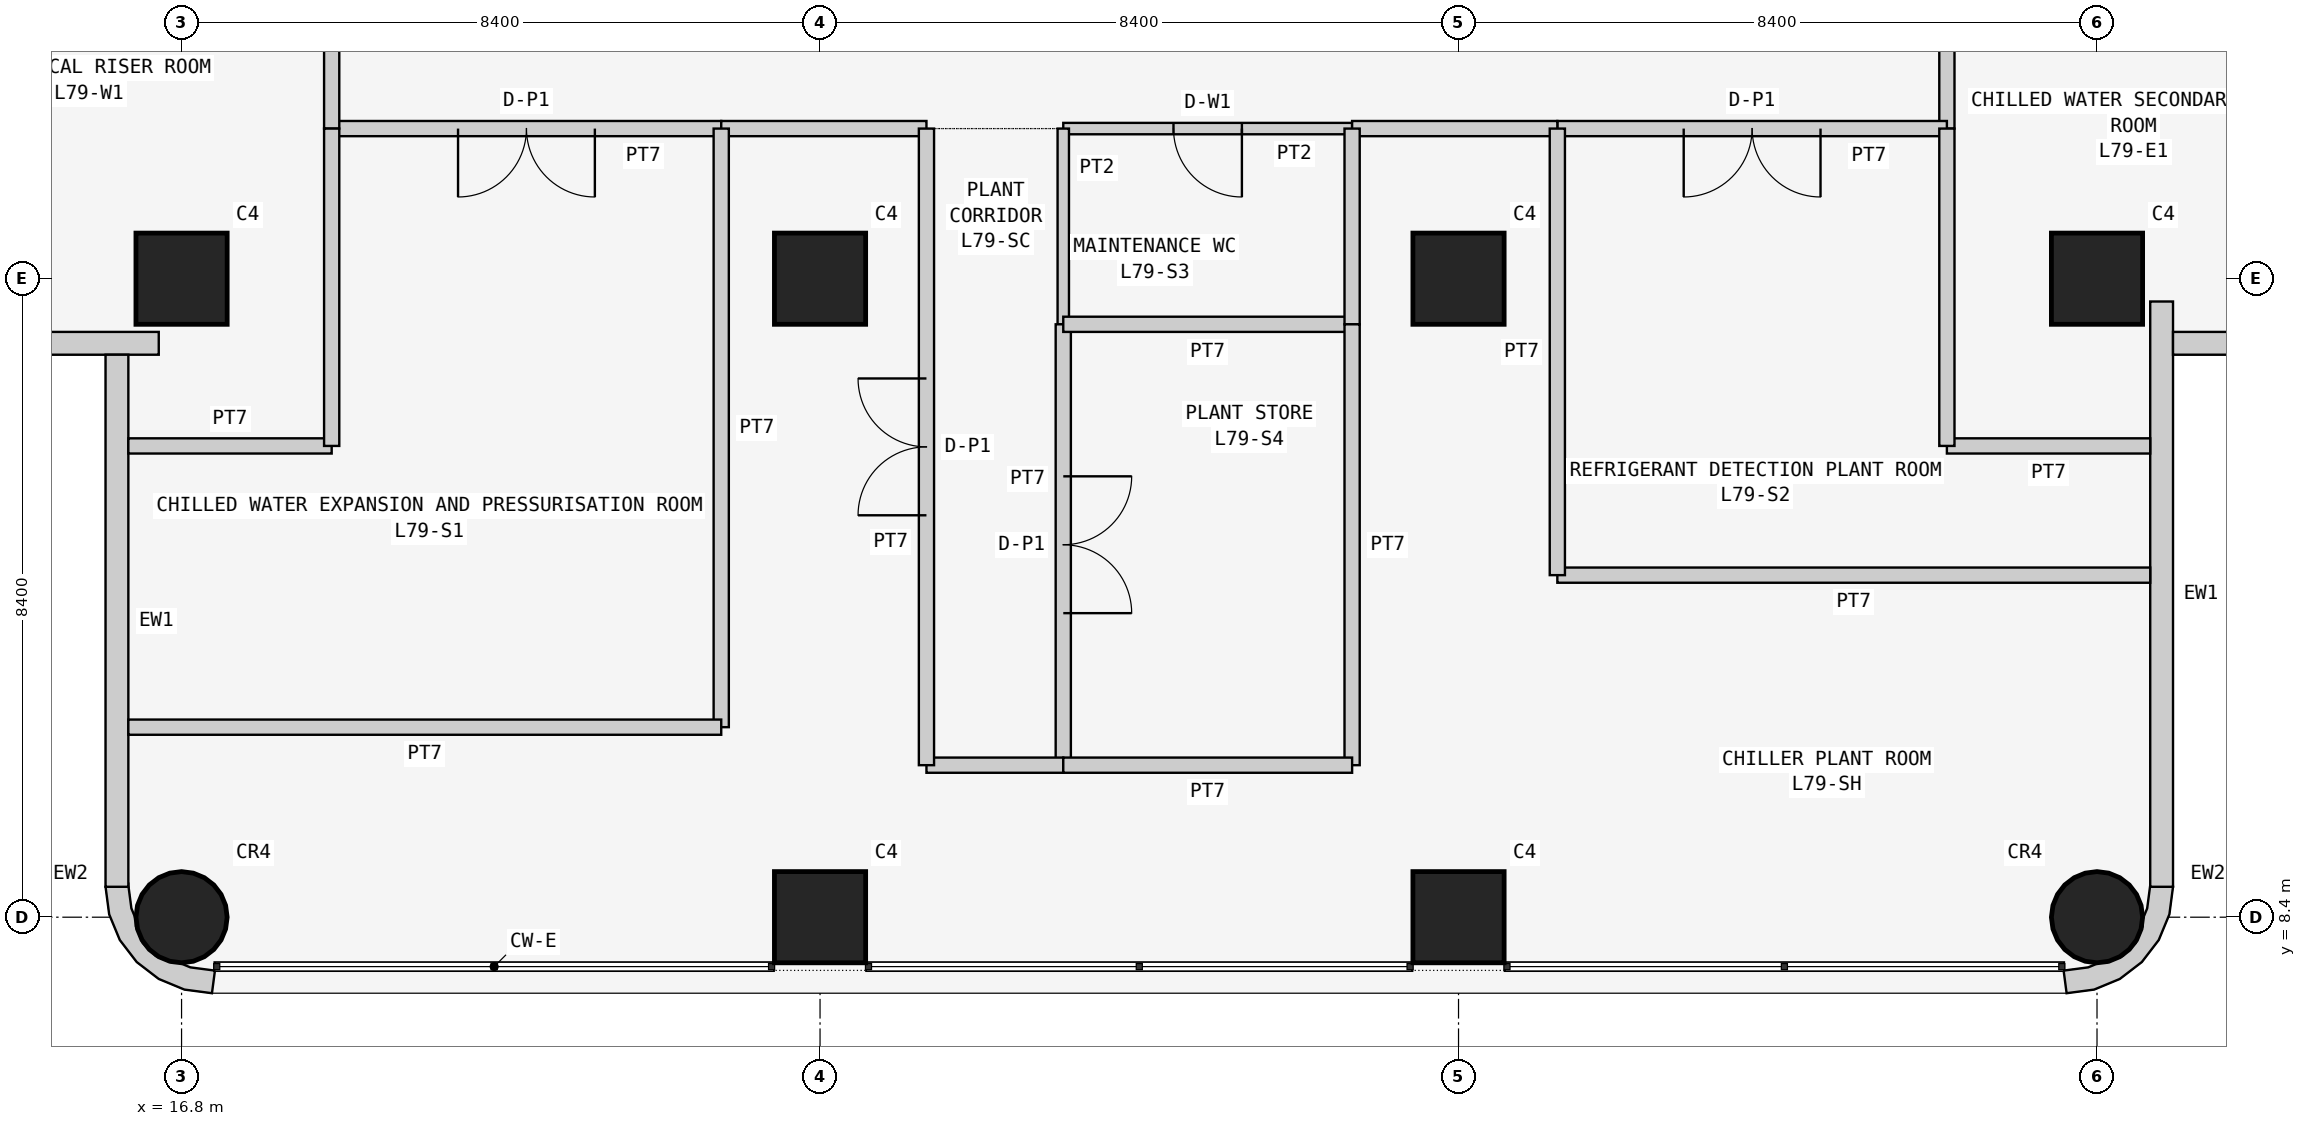
"""IFC4 building model, lengths in metres.
Left out: names, types, materials, properties, quantities, classifications, styles, units other than length and angle.
Written with IfcOpenShell. Run it as: python <this file> out.ifc"""

import sys

from ifc_helpers import new_model, si_unit, direction, frame, frame_2d, origin, origin_2d, place, context, subcontext, project, spatial, polyline, rectangle, circle, outline, extrude, element, fill, save


model = new_model("IFC4")
c1 = context("Model", 3, precision=1e-05, world=origin(), true_north=direction((0.0, 1.0)))
c2 = subcontext(c1, "Body", "Model", "MODEL_VIEW")
j1 = project(units=[si_unit("LENGTHUNIT", "METRE"), si_unit("PLANEANGLEUNIT", "RADIAN")], contexts=[c1])
p1 = place(None, origin())
s1 = spatial("IfcSite", under=j1, at=p1, CompositionType="ELEMENT")
p2 = place(p1, origin())
s2 = spatial("IfcBuilding", under=s1, at=p2, CompositionType="ELEMENT")
p3 = place(p2, frame((0.0, 0.0, 300.9)))
s3 = spatial("IfcBuildingStorey", under=s2, at=p3, CompositionType="ELEMENT", Elevation=300.9)
p4 = place(p3, frame((16.8, 8.4, 0.0), z_axis=(0.0, 0.0, 1.0), x_axis=(1.0, 0.0, 0.0)))
e1 = element("IfcColumn", 1, at=p4, inside=s3, PredefinedType="COLUMN", context=c2, shape_type="SweptSolid", body=[
    extrude(circle(Radius=0.6, at=origin_2d()), origin(), (0.0, 0.0, 1.0), 4.5),
])
for number, where, z_axis, x_axis in (
    (2, (16.8, 16.8, 0.0), (0.0, 0.0, 1.0), (1.0, 0.0, 0.0)),
    (3, (25.2, 8.4, 0.0), (0.0, 0.0, 1.0), (1.0, 0.0, 0.0)),
    (4, (25.2, 16.8, 0.0), (0.0, 0.0, 1.0), (1.0, 0.0, 0.0)),
    (5, (33.6, 8.4, 0.0), (0.0, 0.0, 1.0), (1.0, 0.0, 0.0)),
    (6, (33.6, 16.8, 0.0), (0.0, 0.0, 1.0), (1.0, 0.0, 0.0)),
):
    element("IfcColumn", number, at=place(p3, frame(where, z_axis=z_axis, x_axis=x_axis)), inside=s3, PredefinedType="COLUMN", context=c2, shape_type="SweptSolid", body=[
        extrude(rectangle(XDim=1.2, YDim=1.2, at=origin_2d()), origin(), (0.0, 0.0, 1.0), 4.5),
    ])
p5 = place(p3, frame((42.0, 8.4, 0.0), z_axis=(0.0, 0.0, 1.0), x_axis=(1.0, 0.0, 0.0)))
e7 = element("IfcColumn", 7, at=p5, inside=s3, PredefinedType="COLUMN", context=c2, shape_type="SweptSolid", body=[
    extrude(circle(Radius=0.6, at=origin_2d()), origin(), (0.0, 0.0, 1.0), 4.5),
])
p6 = place(p3, frame((42.0, 16.8, 0.0), z_axis=(0.0, 0.0, 1.0), x_axis=(1.0, 0.0, 0.0)))
e8 = element("IfcColumn", 8, at=p6, inside=s3, PredefinedType="COLUMN", context=c2, shape_type="SweptSolid", body=[
    extrude(rectangle(XDim=1.2, YDim=1.2, at=origin_2d()), origin(), (0.0, 0.0, 1.0), 4.5),
])
p7 = place(p3, frame((8.8, 15.95, 0.0), z_axis=(0.0, 0.0, 1.0), x_axis=(1.0, 0.0, 0.0)))
e9 = element("IfcWall", 9, at=p7, inside=s3, PredefinedType="SOLIDWALL", context=c2, shape_type="SweptSolid", body=[
    extrude(rectangle(XDim=7.7, YDim=0.3, at=frame_2d((3.85, 0.0))), origin(), (0.0, 0.0, 1.0), 4.25),
])
p8 = place(p3, frame((15.95, 15.8, 0.0), z_axis=(0.0, 0.0, 1.0), x_axis=(0.0, -1.0, 0.0)))
e10 = element("IfcWall", 10, at=p8, inside=s3, PredefinedType="SOLIDWALL", context=c2, shape_type="SweptSolid", body=[
    extrude(rectangle(XDim=7.0, YDim=0.3, at=frame_2d((3.5, 0.0))), origin(), (0.0, 0.0, 1.0), 4.25),
])
p9 = place(p3, frame((42.85, 8.8, 0.0), z_axis=(0.0, 0.0, 1.0), x_axis=(0.0, 1.0, 0.0)))
e11 = element("IfcWall", 11, at=p9, inside=s3, PredefinedType="SOLIDWALL", context=c2, shape_type="SweptSolid", body=[
    extrude(rectangle(XDim=7.7, YDim=0.3, at=frame_2d((3.85, 0.0))), origin(), (0.0, 0.0, 1.0), 4.25),
])
p10 = place(p3, frame((43.0, 15.95, 0.0), z_axis=(0.0, 0.0, 1.0), x_axis=(1.0, 0.0, 0.0)))
e12 = element("IfcWall", 12, at=p10, inside=s3, PredefinedType="SOLIDWALL", context=c2, shape_type="SweptSolid", body=[
    extrude(rectangle(XDim=7.0, YDim=0.3, at=frame_2d((3.5, 0.0))), origin(), (0.0, 0.0, 1.0), 4.25),
])
p11 = place(p3, frame((16.224, 8.762, 0.0), z_axis=(0.0, 0.0, 1.0), x_axis=(-0.707106781187, -0.707106781187, 0.0)))
e13 = element("IfcWall", 13, at=p11, inside=s3, PredefinedType="SOLIDWALL", context=c2, shape_type="SweptSolid", body=[
    extrude(outline(polyline([(0.033, 1.469), (0.047, 1.455), (0.233, 1.212), (0.292, 1.069), (0.358, 1.003), (0.449, 0.783), (0.449, 0.543), (0.358, 0.322), (0.292, 0.257), (0.233, 0.114), (0.047, -0.129), (0.033, -0.143), (0.273, -0.327), (0.495, -0.037), (0.635, 0.3), (0.683, 0.663), (0.635, 1.025), (0.495, 1.363), (0.273, 1.653), (0.033, 1.469)])), origin(), (0.0, 0.0, 1.0), 4.25),
])
p12 = place(p3, frame((41.638, 7.824, 0.0), z_axis=(0.0, 0.0, 1.0), x_axis=(0.707106781187, -0.707106781187, 0.0)))
e14 = element("IfcWall", 14, at=p12, inside=s3, PredefinedType="SOLIDWALL", context=c2, shape_type="SweptSolid", body=[
    extrude(outline(polyline([(0.033, 1.469), (0.047, 1.455), (0.233, 1.212), (0.292, 1.069), (0.358, 1.003), (0.449, 0.782), (0.449, 0.543), (0.358, 0.322), (0.292, 0.257), (0.233, 0.114), (0.047, -0.129), (0.033, -0.143), (0.273, -0.327), (0.495, -0.037), (0.635, 0.301), (0.683, 0.663), (0.635, 1.025), (0.495, 1.363), (0.273, 1.653), (0.033, 1.469)])), origin(), (0.0, 0.0, 1.0), 4.25),
])
p13 = place(p3, frame((40.025, 23.9, 0.0), z_axis=(0.0, 0.0, 1.0), x_axis=(0.0, -1.0, 0.0)))
e15 = element("IfcWall", 15, at=p13, inside=s3, PredefinedType="PARTITIONING", context=c2, shape_type="SweptSolid", body=[
    extrude(rectangle(XDim=5.125, YDim=0.2, at=frame_2d((2.562, 0.0))), origin(), (0.0, 0.0, 1.0), 4.25),
])
p14 = place(p13, frame((1.663, 0.0, 0.0)))
e16 = element("IfcOpeningElement", 16, at=p14, cuts=e15, PredefinedType="OPENING", context=c2, shape_type="SweptSolid", body=[
    extrude(rectangle(XDim=1.8, YDim=2.4, at=frame_2d((0.9, 1.2))), frame((0.0, 0.11, 0.0), z_axis=(0.0, -1.0, 0.0), x_axis=(1.0, 0.0, 0.0)), (0.0, 0.0, 1.0), 0.22),
])
p15 = place(p3, frame((23.9, 18.775, 0.0), z_axis=(0.0, 0.0, 1.0), x_axis=(-1.0, 0.0, 0.0)))
e17 = element("IfcWall", 17, at=p15, inside=s3, PredefinedType="PARTITIONING", context=c2, shape_type="SweptSolid", body=[
    extrude(rectangle(XDim=5.125, YDim=0.2, at=frame_2d((2.562, 0.0))), origin(), (0.0, 0.0, 1.0), 4.25),
])
p16 = place(p15, frame((1.663, 0.0, 0.0)))
e18 = element("IfcOpeningElement", 18, at=p16, cuts=e17, PredefinedType="OPENING", context=c2, shape_type="SweptSolid", body=[
    extrude(rectangle(XDim=1.8, YDim=2.4, at=frame_2d((0.9, 1.2))), frame((0.0, 0.11, 0.0), z_axis=(0.0, -1.0, 0.0), x_axis=(1.0, 0.0, 0.0)), (0.0, 0.0, 1.0), 0.22),
])
p17 = place(p3, frame((40.025, 18.775, 0.0), z_axis=(0.0, 0.0, 1.0), x_axis=(-1.0, 0.0, 0.0)))
e19 = element("IfcWall", 19, at=p17, inside=s3, PredefinedType="PARTITIONING", context=c2, shape_type="SweptSolid", body=[
    extrude(rectangle(XDim=5.125, YDim=0.2, at=frame_2d((2.562, 0.0))), origin(), (0.0, 0.0, 1.0), 4.25),
])
p18 = place(p17, frame((1.663, 0.0, 0.0)))
e20 = element("IfcOpeningElement", 20, at=p18, cuts=e19, PredefinedType="OPENING", context=c2, shape_type="SweptSolid", body=[
    extrude(rectangle(XDim=1.8, YDim=2.4, at=frame_2d((0.9, 1.2))), frame((0.0, 0.11, 0.0), z_axis=(0.0, -1.0, 0.0), x_axis=(1.0, 0.0, 0.0)), (0.0, 0.0, 1.0), 0.22),
])
p19 = place(p3, frame((32.2, 18.775, 0.0), z_axis=(0.0, 0.0, 1.0), x_axis=(-1.0, 0.0, 0.0)))
e21 = element("IfcWall", 21, at=p19, inside=s3, PredefinedType="PARTITIONING", context=c2, shape_type="SweptSolid", body=[
    extrude(rectangle(XDim=3.8, YDim=0.15, at=frame_2d((1.9, 0.0))), origin(), (0.0, 0.0, 1.0), 4.25),
])
p20 = place(p19, frame((1.45, 0.0, 0.0)))
e22 = element("IfcOpeningElement", 22, at=p20, cuts=e21, PredefinedType="OPENING", context=c2, shape_type="SweptSolid", body=[
    extrude(rectangle(XDim=0.9, YDim=2.1, at=frame_2d((0.45, 1.05))), frame((0.0, 0.085, 0.0), z_axis=(0.0, -1.0, 0.0), x_axis=(1.0, 0.0, 0.0)), (0.0, 0.0, 1.0), 0.17),
])
p21 = place(p3, frame((26.6, 18.775, 0.0), z_axis=(0.0, 0.0, 1.0), x_axis=(-1.0, 0.0, 0.0)))
e23 = element("IfcWall", 23, at=p21, inside=s3, PredefinedType="PARTITIONING", context=c2, shape_type="SweptSolid", body=[
    extrude(rectangle(XDim=2.7, YDim=0.2, at=frame_2d((1.35, 0.0))), origin(), (0.0, 0.0, 1.0), 4.25),
])
p22 = place(p3, frame((34.9, 18.775, 0.0), z_axis=(0.0, 0.0, 1.0), x_axis=(-1.0, 0.0, 0.0)))
e24 = element("IfcWall", 24, at=p22, inside=s3, PredefinedType="PARTITIONING", context=c2, shape_type="SweptSolid", body=[
    extrude(rectangle(XDim=2.7, YDim=0.2, at=frame_2d((1.35, 0.0))), origin(), (0.0, 0.0, 1.0), 4.25),
])
p23 = place(p3, frame((18.775, 18.775, 0.0), z_axis=(0.0, 0.0, 1.0), x_axis=(0.0, 1.0, 0.0)))
e25 = element("IfcWall", 25, at=p23, inside=s3, PredefinedType="PARTITIONING", context=c2, shape_type="SweptSolid", body=[
    extrude(rectangle(XDim=5.125, YDim=0.2, at=frame_2d((2.562, 0.0))), origin(), (0.0, 0.0, 1.0), 4.25),
])
p24 = place(p23, frame((1.663, 0.0, 0.0)))
e26 = element("IfcOpeningElement", 26, at=p24, cuts=e25, PredefinedType="OPENING", context=c2, shape_type="SweptSolid", body=[
    extrude(rectangle(XDim=1.8, YDim=2.4, at=frame_2d((0.9, 1.2))), frame((0.0, 0.11, 0.0), z_axis=(0.0, -1.0, 0.0), x_axis=(1.0, 0.0, 0.0)), (0.0, 0.0, 1.0), 0.22),
])
p25 = place(p3, frame((42.7, 14.6, 0.0), z_axis=(0.0, 0.0, 1.0), x_axis=(-1.0, 0.0, 0.0)))
e27 = element("IfcWall", 27, at=p25, inside=s3, PredefinedType="PARTITIONING", context=c2, shape_type="SweptSolid", body=[
    extrude(rectangle(XDim=2.675, YDim=0.2, at=frame_2d((1.337, 0.0))), origin(), (0.0, 0.0, 1.0), 4.25),
])
p26 = place(p3, frame((40.025, 14.6, 0.0), z_axis=(0.0, 0.0, 1.0), x_axis=(0.0, 1.0, 0.0)))
e28 = element("IfcWall", 28, at=p26, inside=s3, PredefinedType="PARTITIONING", context=c2, shape_type="SweptSolid", body=[
    extrude(rectangle(XDim=4.175, YDim=0.2, at=frame_2d((2.087, 0.0))), origin(), (0.0, 0.0, 1.0), 4.25),
])
p27 = place(p3, frame((23.9, 18.775, 0.0), z_axis=(0.0, 0.0, 1.0), x_axis=(0.0, -1.0, 0.0)))
e29 = element("IfcWall", 29, at=p27, inside=s3, PredefinedType="PARTITIONING", context=c2, shape_type="SweptSolid", body=[
    extrude(rectangle(XDim=7.875, YDim=0.2, at=frame_2d((3.938, 0.0))), origin(), (0.0, 0.0, 1.0), 4.25),
])
p28 = place(p3, frame((23.9, 10.9, 0.0), z_axis=(0.0, 0.0, 1.0), x_axis=(-1.0, 0.0, 0.0)))
e30 = element("IfcWall", 30, at=p28, inside=s3, PredefinedType="PARTITIONING", context=c2, shape_type="SweptSolid", body=[
    extrude(rectangle(XDim=7.8, YDim=0.2, at=frame_2d((3.9, 0.0))), origin(), (0.0, 0.0, 1.0), 4.25),
])
p29 = place(p3, frame((16.1, 14.6, 0.0), z_axis=(0.0, 0.0, 1.0), x_axis=(1.0, 0.0, 0.0)))
e31 = element("IfcWall", 31, at=p29, inside=s3, PredefinedType="PARTITIONING", context=c2, shape_type="SweptSolid", body=[
    extrude(rectangle(XDim=2.675, YDim=0.2, at=frame_2d((1.337, 0.0))), origin(), (0.0, 0.0, 1.0), 4.25),
])
p30 = place(p3, frame((18.775, 14.6, 0.0), z_axis=(0.0, 0.0, 1.0), x_axis=(0.0, 1.0, 0.0)))
e32 = element("IfcWall", 32, at=p30, inside=s3, PredefinedType="PARTITIONING", context=c2, shape_type="SweptSolid", body=[
    extrude(rectangle(XDim=4.175, YDim=0.2, at=frame_2d((2.087, 0.0))), origin(), (0.0, 0.0, 1.0), 4.25),
])
p31 = place(p3, frame((42.7, 12.9, 0.0), z_axis=(0.0, 0.0, 1.0), x_axis=(-1.0, 0.0, 0.0)))
e33 = element("IfcWall", 33, at=p31, inside=s3, PredefinedType="PARTITIONING", context=c2, shape_type="SweptSolid", body=[
    extrude(rectangle(XDim=7.8, YDim=0.2, at=frame_2d((3.9, 0.0))), origin(), (0.0, 0.0, 1.0), 4.25),
])
p32 = place(p3, frame((34.9, 12.9, 0.0), z_axis=(0.0, 0.0, 1.0), x_axis=(0.0, 1.0, 0.0)))
e34 = element("IfcWall", 34, at=p32, inside=s3, PredefinedType="PARTITIONING", context=c2, shape_type="SweptSolid", body=[
    extrude(rectangle(XDim=5.875, YDim=0.2, at=frame_2d((2.938, 0.0))), origin(), (0.0, 0.0, 1.0), 4.25),
])
p33 = place(p3, frame((28.4, 18.775, 0.0), z_axis=(0.0, 0.0, 1.0), x_axis=(0.0, -1.0, 0.0)))
e35 = element("IfcWall", 35, at=p33, inside=s3, PredefinedType="PARTITIONING", context=c2, shape_type="SweptSolid", body=[
    extrude(rectangle(XDim=2.575, YDim=0.15, at=frame_2d((1.288, 0.0))), origin(), (0.0, 0.0, 1.0), 4.25),
])
p34 = place(p3, frame((28.4, 16.2, 0.0), z_axis=(0.0, 0.0, 1.0), x_axis=(0.0, -1.0, 0.0)))
e36 = element("IfcWall", 36, at=p34, inside=s3, PredefinedType="PARTITIONING", context=c2, shape_type="SweptSolid", body=[
    extrude(rectangle(XDim=5.8, YDim=0.2, at=frame_2d((2.9, 0.0))), origin(), (0.0, 0.0, 1.0), 4.25),
])
p35 = place(p34, frame((2.0, 0.0, 0.0)))
e37 = element("IfcOpeningElement", 37, at=p35, cuts=e36, PredefinedType="OPENING", context=c2, shape_type="SweptSolid", body=[
    extrude(rectangle(XDim=1.8, YDim=2.4, at=frame_2d((0.9, 1.2))), frame((0.0, 0.11, 0.0), z_axis=(0.0, -1.0, 0.0), x_axis=(1.0, 0.0, 0.0)), (0.0, 0.0, 1.0), 0.22),
])
p36 = place(p3, frame((28.4, 10.4, 0.0), z_axis=(0.0, 0.0, 1.0), x_axis=(-1.0, 0.0, 0.0)))
e38 = element("IfcWall", 38, at=p36, inside=s3, PredefinedType="PARTITIONING", context=c2, shape_type="SweptSolid", body=[
    extrude(rectangle(XDim=1.8, YDim=0.2, at=frame_2d((0.9, 0.0))), origin(), (0.0, 0.0, 1.0), 4.25),
])
p37 = place(p3, frame((26.6, 10.4, 0.0), z_axis=(0.0, 0.0, 1.0), x_axis=(0.0, 1.0, 0.0)))
e39 = element("IfcWall", 39, at=p37, inside=s3, PredefinedType="PARTITIONING", context=c2, shape_type="SweptSolid", body=[
    extrude(rectangle(XDim=8.375, YDim=0.2, at=frame_2d((4.188, 0.0))), origin(), (0.0, 0.0, 1.0), 4.25),
])
p38 = place(p37, frame((3.288, 0.0, 0.0)))
e40 = element("IfcOpeningElement", 40, at=p38, cuts=e39, PredefinedType="OPENING", context=c2, shape_type="SweptSolid", body=[
    extrude(rectangle(XDim=1.8, YDim=2.4, at=frame_2d((0.9, 1.2))), frame((0.0, 0.11, 0.0), z_axis=(0.0, -1.0, 0.0), x_axis=(1.0, 0.0, 0.0)), (0.0, 0.0, 1.0), 0.22),
])
p39 = place(p3, frame((32.2, 16.2, 0.0), z_axis=(0.0, 0.0, 1.0), x_axis=(-1.0, 0.0, 0.0)))
e41 = element("IfcWall", 41, at=p39, inside=s3, PredefinedType="PARTITIONING", context=c2, shape_type="SweptSolid", body=[
    extrude(rectangle(XDim=3.8, YDim=0.2, at=frame_2d((1.9, 0.0))), origin(), (0.0, 0.0, 1.0), 4.25),
])
p40 = place(p3, frame((32.2, 18.775, 0.0), z_axis=(0.0, 0.0, 1.0), x_axis=(0.0, -1.0, 0.0)))
e42 = element("IfcWall", 42, at=p40, inside=s3, PredefinedType="PARTITIONING", context=c2, shape_type="SweptSolid", body=[
    extrude(rectangle(XDim=2.575, YDim=0.2, at=frame_2d((1.288, 0.0))), origin(), (0.0, 0.0, 1.0), 4.25),
])
p41 = place(p3, frame((32.2, 16.2, 0.0), z_axis=(0.0, 0.0, 1.0), x_axis=(0.0, -1.0, 0.0)))
e43 = element("IfcWall", 43, at=p41, inside=s3, PredefinedType="PARTITIONING", context=c2, shape_type="SweptSolid", body=[
    extrude(rectangle(XDim=5.8, YDim=0.2, at=frame_2d((2.9, 0.0))), origin(), (0.0, 0.0, 1.0), 4.25),
])
p42 = place(p3, frame((32.2, 10.4, 0.0), z_axis=(0.0, 0.0, 1.0), x_axis=(-1.0, 0.0, 0.0)))
e44 = element("IfcWall", 44, at=p42, inside=s3, PredefinedType="PARTITIONING", context=c2, shape_type="SweptSolid", body=[
    extrude(rectangle(XDim=3.8, YDim=0.2, at=frame_2d((1.9, 0.0))), origin(), (0.0, 0.0, 1.0), 4.25),
])
p43 = place(p16, origin())
e45 = element("IfcDoor", 45, at=p43, inside=s3, OperationType="DOUBLE_DOOR_SINGLE_SWING", PredefinedType="DOOR", context=c2, shape_type="SweptSolid", body=[
    extrude(rectangle(XDim=1.8, YDim=2.4, at=frame_2d((0.9, 1.2))), frame((0.0, 0.025, 0.0), z_axis=(0.0, -1.0, 0.0), x_axis=(1.0, 0.0, 0.0)), (0.0, 0.0, 1.0), 0.05),
])
fill(e18, e45)
p44 = place(p18, origin())
e46 = element("IfcDoor", 46, at=p44, inside=s3, OperationType="DOUBLE_DOOR_SINGLE_SWING", PredefinedType="DOOR", context=c2, shape_type="SweptSolid", body=[
    extrude(rectangle(XDim=1.8, YDim=2.4, at=frame_2d((0.9, 1.2))), frame((0.0, 0.025, 0.0), z_axis=(0.0, -1.0, 0.0), x_axis=(1.0, 0.0, 0.0)), (0.0, 0.0, 1.0), 0.05),
])
fill(e20, e46)
p45 = place(p20, origin())
e47 = element("IfcDoor", 47, at=p45, inside=s3, OperationType="SINGLE_SWING_LEFT", PredefinedType="DOOR", context=c2, shape_type="SweptSolid", body=[
    extrude(rectangle(XDim=0.9, YDim=2.1, at=frame_2d((0.45, 1.05))), frame((0.0, 0.025, 0.0), z_axis=(0.0, -1.0, 0.0), x_axis=(1.0, 0.0, 0.0)), (0.0, 0.0, 1.0), 0.05),
])
fill(e22, e47)
p46 = place(p35, origin())
e48 = element("IfcDoor", 48, at=p46, inside=s3, OperationType="DOUBLE_DOOR_SINGLE_SWING", PredefinedType="DOOR", context=c2, shape_type="SweptSolid", body=[
    extrude(rectangle(XDim=1.8, YDim=2.4, at=frame_2d((0.9, 1.2))), frame((0.0, 0.025, 0.0), z_axis=(0.0, -1.0, 0.0), x_axis=(1.0, 0.0, 0.0)), (0.0, 0.0, 1.0), 0.05),
])
fill(e37, e48)
p47 = place(p38, origin())
e49 = element("IfcDoor", 49, at=p47, inside=s3, OperationType="DOUBLE_DOOR_SINGLE_SWING", PredefinedType="DOOR", context=c2, shape_type="SweptSolid", body=[
    extrude(rectangle(XDim=1.8, YDim=2.4, at=frame_2d((0.9, 1.2))), frame((0.0, 0.025, 0.0), z_axis=(0.0, -1.0, 0.0), x_axis=(1.0, 0.0, 0.0)), (0.0, 0.0, 1.0), 0.05),
])
fill(e40, e49)
save(model, sys.argv[1])
